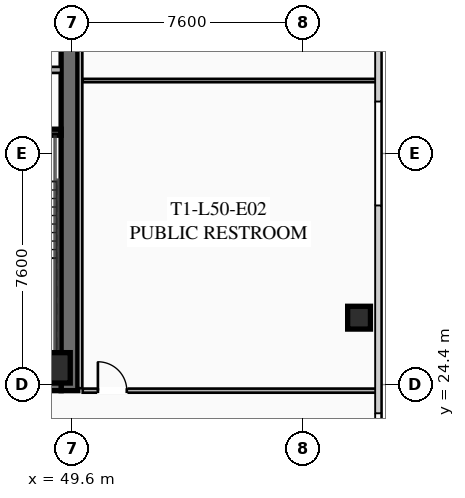
"""IFC4 building model, lengths in metres.
Left out: names, types, materials, properties, quantities, classifications, styles, units other than length and angle.
Written with IfcOpenShell. Run it as: python <this file> out.ifc"""

import sys

from ifc_helpers import new_model, si_unit, direction, frame, frame_2d, origin, origin_2d, place, context, subcontext, project, spatial, rectangle, hollow_rectangle, extrude, element, fill, save


model = new_model("IFC4")
c1 = context("Model", 3, precision=1e-05, world=origin(), true_north=direction((0.0, 1.0)))
c2 = subcontext(c1, "Body", "Model", "MODEL_VIEW")
j1 = project(units=[si_unit("LENGTHUNIT", "METRE"), si_unit("PLANEANGLEUNIT", "RADIAN")], contexts=[c1])
p1 = place(None, origin())
s1 = spatial("IfcSite", under=j1, at=p1, CompositionType="ELEMENT")
p2 = place(p1, origin())
s2 = spatial("IfcBuilding", under=s1, at=p2, CompositionType="ELEMENT")
p3 = place(p2, frame((0.0, 0.0, 185.4)))
s3 = spatial("IfcBuildingStorey", under=s2, at=p3, CompositionType="ELEMENT", Elevation=185.4)
p4 = place(p3, frame((49.525, 39.8, 0.0), z_axis=(0.0, 0.0, 1.0), x_axis=(0.0, -1.0, 0.0)))
e1 = element("IfcWall", 1, at=p4, inside=s3, PredefinedType="SHEAR", context=c2, shape_type="SweptSolid", body=[
    extrude(rectangle(XDim=15.6, YDim=0.55, at=frame_2d((7.8, 0.0))), origin(), (0.0, 0.0, 1.0), 3.55),
])
p5 = place(p3, frame((49.25, 24.475, 0.0), z_axis=(0.0, 0.0, 1.0), x_axis=(-1.0, 0.0, 0.0)))
e2 = element("IfcWall", 2, at=p5, inside=s3, PredefinedType="SHEAR", context=c2, shape_type="SweptSolid", body=[
    extrude(rectangle(XDim=14.5, YDim=0.55, at=frame_2d((7.25, 0.0))), origin(), (0.0, 0.0, 1.0), 3.55),
])
p6 = place(p5, frame((8.95, 0.0, 0.0)))
e3 = element("IfcOpeningElement", 3, at=p6, cuts=e2, PredefinedType="OPENING", context=c2, shape_type="SweptSolid", body=[
    extrude(rectangle(XDim=1.25, YDim=2.25, at=frame_2d((0.625, 1.125))), frame((0.0, 0.285, 0.0), z_axis=(0.0, -1.0, 0.0), x_axis=(1.0, 0.0, 0.0)), (0.0, 0.0, 1.0), 0.57),
])
p7 = place(p5, frame((3.9, 0.0, 0.0)))
e4 = element("IfcOpeningElement", 4, at=p7, cuts=e2, PredefinedType="OPENING", context=c2, shape_type="SweptSolid", body=[
    extrude(rectangle(XDim=1.25, YDim=2.25, at=frame_2d((0.625, 1.125))), frame((0.0, 0.285, 0.0), z_axis=(0.0, -1.0, 0.0), x_axis=(1.0, 0.0, 0.0)), (0.0, 0.0, 1.0), 0.57),
])
p8 = place(p3, frame((49.05, 24.95, 0.0), z_axis=(0.0, 0.0, 1.0), x_axis=(1.0, 0.0, 0.0)))
e5 = element("IfcColumn", 5, at=p8, inside=s3, PredefinedType="COLUMN", context=c2, shape_type="SweptSolid", body=[
    extrude(hollow_rectangle(XDim=1.0, YDim=1.0, WallThickness=0.04, at=origin_2d()), origin(), (0.0, 0.0, 1.0), 3.37),
])
p9 = place(p3, frame((59.05, 26.6, 0.0), z_axis=(0.0, 0.0, 1.0), x_axis=(1.0, 0.0, 0.0)))
e6 = element("IfcColumn", 6, at=p9, inside=s3, PredefinedType="COLUMN", context=c2, shape_type="SweptSolid", body=[
    extrude(hollow_rectangle(XDim=0.75, YDim=0.75, WallThickness=0.032, at=origin_2d()), origin(), (0.0, 0.0, 1.0), 3.37),
])
for number, where, z_axis, x_axis in (
    (7, (45.7, 32.7, 0.0), (0.0, 0.0, 1.0), (1.0, 0.0, 0.0)),
    (8, (45.7, 25.3, 0.0), (0.0, 0.0, 1.0), (1.0, 0.0, 0.0)),
):
    element("IfcWall", number, at=place(p3, frame(where, z_axis=z_axis, x_axis=x_axis)), inside=s3, PredefinedType="SHEAR", context=c2, shape_type="SweptSolid", body=[
        extrude(rectangle(XDim=3.55, YDim=0.2, at=frame_2d((1.775, 0.0))), origin(), (0.0, 0.0, 1.0), 3.37),
    ])
p10 = place(p3, frame((46.05, 34.75, 0.0), z_axis=(0.0, 0.0, 1.0), x_axis=(1.0, 0.0, 0.0)))
e9 = element("IfcWall", 9, at=p10, inside=s3, PredefinedType="SOLIDWALL", context=c2, shape_type="SweptSolid", body=[
    extrude(rectangle(XDim=3.2, YDim=0.2, at=frame_2d((1.6, 0.0))), origin(), (0.0, 0.0, 1.0), 3.37),
])
p11 = place(p3, frame((49.88, 39.72, 0.0), z_axis=(0.0, 0.0, 1.0), x_axis=(0.0, -1.0, 0.0)))
e10 = element("IfcWall", 10, at=p11, inside=s3, PredefinedType="PARTITIONING", context=c2, shape_type="SweptSolid", body=[
    extrude(rectangle(XDim=15.44, YDim=0.135, at=frame_2d((7.72, 0.0))), origin(), (0.0, 0.0, 1.0), 2.723),
])
p12 = place(p3, frame((49.96, 24.2, 0.0), z_axis=(0.0, 0.0, 1.0), x_axis=(1.0, 0.0, 0.0)))
e11 = element("IfcWall", 11, at=p12, inside=s3, PredefinedType="PARTITIONING", context=c2, shape_type="SweptSolid", body=[
    extrude(rectangle(XDim=9.72, YDim=0.135, at=frame_2d((4.86, 0.0))), origin(), (0.0, 0.0, 1.0), 2.723),
])
p13 = place(p12, frame((0.5, 0.0, 0.0)))
e12 = element("IfcOpeningElement", 12, at=p13, cuts=e11, PredefinedType="OPENING", context=c2, shape_type="SweptSolid", body=[
    extrude(rectangle(XDim=0.95, YDim=2.05, at=frame_2d((0.475, 1.025))), frame((0.0, 0.077, 0.0), z_axis=(0.0, -1.0, 0.0), x_axis=(1.0, 0.0, 0.0)), (0.0, 0.0, 1.0), 0.155),
])
p14 = place(p3, frame((49.96, 34.4, 0.0), z_axis=(0.0, 0.0, 1.0), x_axis=(1.0, 0.0, 0.0)))
e13 = element("IfcWall", 13, at=p14, inside=s3, PredefinedType="PARTITIONING", context=c2, shape_type="SweptSolid", body=[
    extrude(rectangle(XDim=9.72, YDim=0.11, at=frame_2d((4.86, 0.0))), origin(), (0.0, 0.0, 1.0), 2.723),
])
p15 = place(p13, origin())
e14 = element("IfcDoor", 14, at=p15, inside=s3, OperationType="SINGLE_SWING_LEFT", PredefinedType="DOOR", context=c2, shape_type="SweptSolid", body=[
    extrude(rectangle(XDim=0.95, YDim=2.05, at=frame_2d((0.475, 1.025))), frame((0.0, 0.025, 0.0), z_axis=(0.0, -1.0, 0.0), x_axis=(1.0, 0.0, 0.0)), (0.0, 0.0, 1.0), 0.05),
])
fill(e12, e14)
save(model, sys.argv[1])
